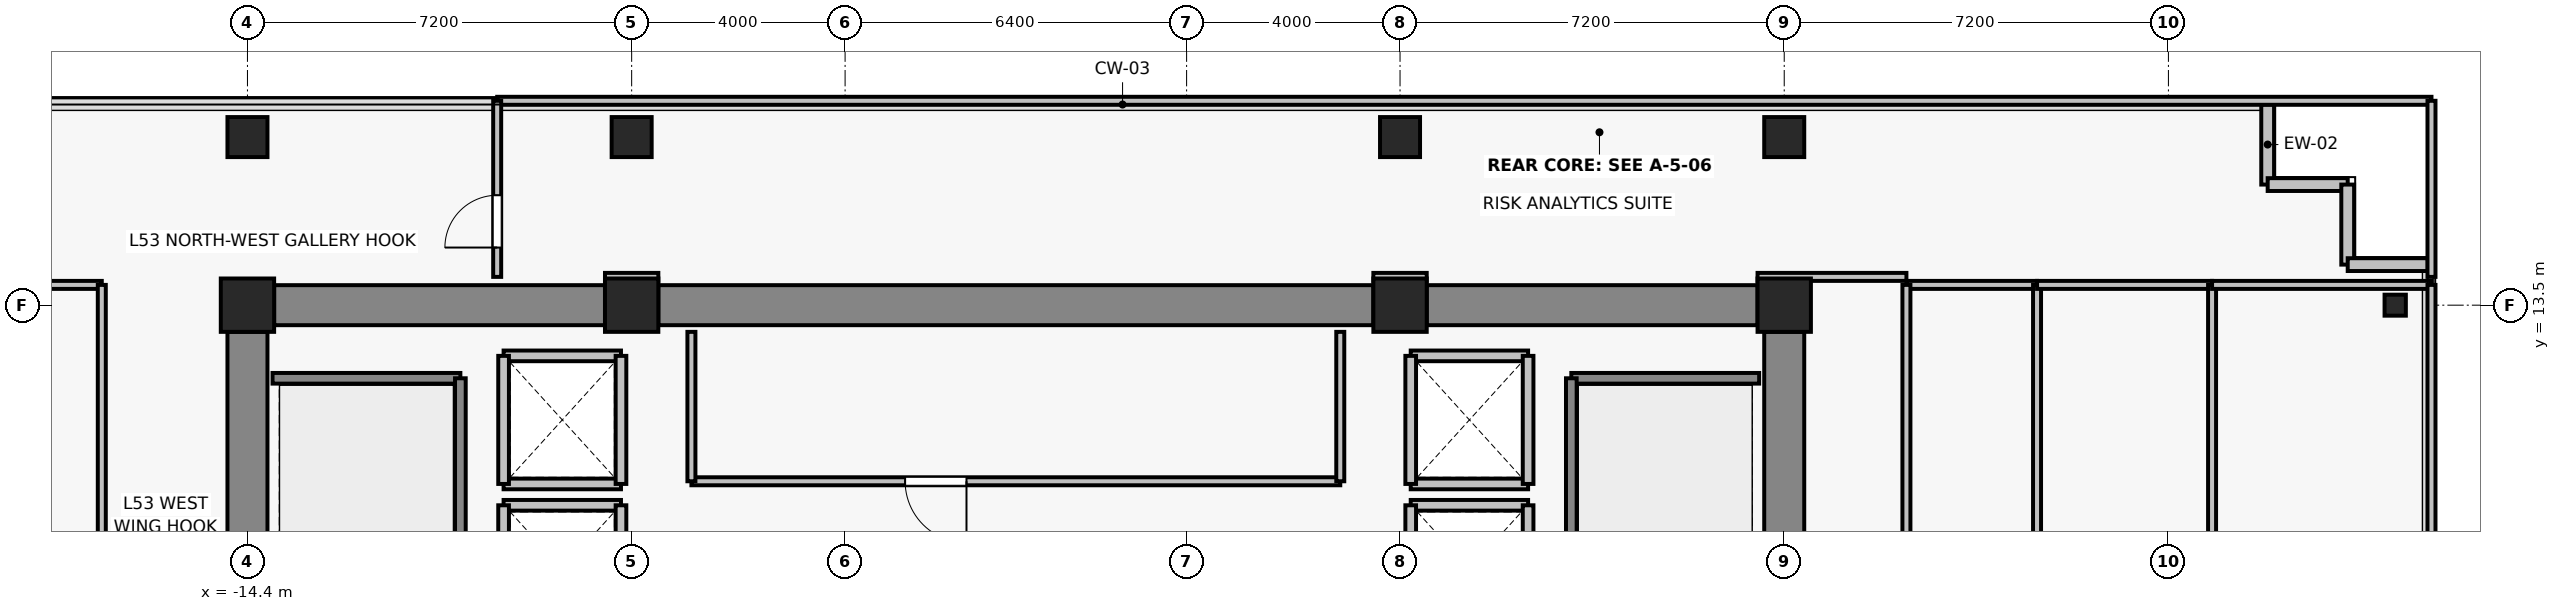
"""IFC4 building model, lengths in metres.
Left out: names, types, materials, properties, quantities, classifications, styles, units other than length and angle.
Written with IfcOpenShell. Run it as: python <this file> out.ifc"""

import sys

from ifc_helpers import new_model, si_unit, direction, frame, frame_2d, origin, origin_2d, place, context, subcontext, project, spatial, rectangle, i_section, extrude, source, transform, mapped, element, fill, save


model = new_model("IFC4")
c1 = context("Model", 3, precision=1e-05, world=origin(), true_north=direction((0.0, 1.0)))
c2 = subcontext(c1, "Body", "Model", "MODEL_VIEW")
j1 = project(units=[si_unit("LENGTHUNIT", "METRE"), si_unit("PLANEANGLEUNIT", "RADIAN")], contexts=[c1])
p1 = place(None, origin())
s1 = spatial("IfcSite", under=j1, at=p1, CompositionType="ELEMENT")
p2 = place(p1, origin())
s2 = spatial("IfcBuilding", under=s1, at=p2, CompositionType="ELEMENT")
p3 = place(p2, frame((0.0, 0.0, 189.1)))
s3 = spatial("IfcBuildingStorey", under=s2, at=p3, CompositionType="ELEMENT", Elevation=189.1)
for number, where, z_axis, x_axis in (
    (1, (-14.4, 13.5, 0.0), (0.0, 0.0, 1.0), (1.0, 0.0, 0.0)),
    (2, (-7.2, 13.5, 0.0), (0.0, 0.0, 1.0), (1.0, 0.0, 0.0)),
    (3, (7.2, 13.5, 0.0), (0.0, 0.0, 1.0), (1.0, 0.0, 0.0)),
    (4, (14.4, 13.5, 0.0), (0.0, 0.0, 1.0), (1.0, 0.0, 0.0)),
):
    element("IfcColumn", number, at=place(p3, frame(where, z_axis=z_axis, x_axis=x_axis)), inside=s3, PredefinedType="COLUMN", context=c2, shape_type="SweptSolid", body=[
        extrude(rectangle(XDim=1.0, YDim=1.0, at=origin_2d()), origin(), (0.0, 0.0, 1.0), 3.3),
    ])
for number, where, z_axis, x_axis in (
    (5, (-14.4, 16.65, 0.0), (0.0, 0.0, 1.0), (1.0, 0.0, 0.0)),
    (6, (-7.2, 16.65, 0.0), (0.0, 0.0, 1.0), (1.0, 0.0, 0.0)),
    (7, (7.2, 16.65, 0.0), (0.0, 0.0, 1.0), (1.0, 0.0, 0.0)),
    (8, (14.4, 16.65, 0.0), (0.0, 0.0, 1.0), (1.0, 0.0, 0.0)),
):
    element("IfcColumn", number, at=place(p3, frame(where, z_axis=z_axis, x_axis=x_axis)), inside=s3, PredefinedType="COLUMN", context=c2, shape_type="SweptSolid", body=[
        extrude(rectangle(XDim=0.75, YDim=0.75, at=origin_2d()), origin(), (0.0, 0.0, 1.0), 3.3),
    ])
p4 = place(p3, frame((25.85, 13.5, 0.0), z_axis=(0.0, 0.0, 1.0), x_axis=(1.0, 0.0, 0.0)))
e9 = element("IfcColumn", 9, at=p4, inside=s3, PredefinedType="COLUMN", context=c2, shape_type="SweptSolid", body=[
    extrude(i_section(OverallWidth=0.399, OverallDepth=0.394, WebThickness=0.023, FlangeThickness=0.037, FilletRadius=0.015, at=origin_2d()), origin(), (0.0, 0.0, 1.0), 3.3),
])
p5 = place(p3, frame((-13.9, 13.5, 0.0), z_axis=(0.0, 0.0, 1.0), x_axis=(1.0, 0.0, 0.0)))
e10 = element("IfcWall", 10, at=p5, inside=s3, PredefinedType="SHEAR", context=c2, shape_type="SweptSolid", body=[
    extrude(rectangle(XDim=6.2, YDim=0.75, at=frame_2d((3.1, 0.0))), origin(), (0.0, 0.0, 1.0), 3.075),
])
p6 = place(p3, frame((-6.7, 13.5, 0.0), z_axis=(0.0, 0.0, 1.0), x_axis=(1.0, 0.0, 0.0)))
e11 = element("IfcWall", 11, at=p6, inside=s3, PredefinedType="SHEAR", context=c2, shape_type="SweptSolid", body=[
    extrude(rectangle(XDim=13.4, YDim=0.75, at=frame_2d((6.7, 0.0))), origin(), (0.0, 0.0, 1.0), 3.075),
])
p7 = place(p3, frame((7.7, 13.5, 0.0), z_axis=(0.0, 0.0, 1.0), x_axis=(1.0, 0.0, 0.0)))
e12 = element("IfcWall", 12, at=p7, inside=s3, PredefinedType="SHEAR", context=c2, shape_type="SweptSolid", body=[
    extrude(rectangle(XDim=6.2, YDim=0.75, at=frame_2d((3.1, 0.0))), origin(), (0.0, 0.0, 1.0), 3.075),
])
for number, where, z_axis, x_axis in (
    (13, (-14.4, 7.1, 0.0), (0.0, 0.0, 1.0), (0.0, 1.0, 0.0)),
    (14, (14.4, 7.1, 0.0), (0.0, 0.0, 1.0), (0.0, 1.0, 0.0)),
):
    element("IfcWall", number, at=place(p3, frame(where, z_axis=z_axis, x_axis=x_axis)), inside=s3, PredefinedType="SHEAR", context=c2, shape_type="SweptSolid", body=[
        extrude(rectangle(XDim=5.9, YDim=0.75, at=frame_2d((2.95, 0.0))), origin(), (0.0, 0.0, 1.0), 3.075),
    ])
for number, where, z_axis, x_axis in (
    (15, (23.46, 15.76, 0.0), (0.0, 0.0, 1.0), (0.0, 1.0, 0.0)),
    (16, (24.96, 15.76, 0.0), (0.0, 0.0, 1.0), (-1.0, 0.0, 0.0)),
    (17, (24.96, 14.26, 0.0), (0.0, 0.0, 1.0), (0.0, 1.0, 0.0)),
    (18, (26.46, 14.26, 0.0), (0.0, 0.0, 1.0), (-1.0, 0.0, 0.0)),
):
    element("IfcWall", number, at=place(p3, frame(where, z_axis=z_axis, x_axis=x_axis)), inside=s3, PredefinedType="SOLIDWALL", context=c2, shape_type="SweptSolid", body=[
        extrude(rectangle(XDim=1.5, YDim=0.24, at=frame_2d((0.75, 0.0))), origin(), (0.0, 0.0, 1.0), 3.075),
    ])
p8 = place(p3, frame((-9.6, 9.75, 0.0), z_axis=(0.0, 0.0, 1.0), x_axis=(1.0, 0.0, 0.0)))
e19 = element("IfcWall", 19, at=p8, inside=s3, PredefinedType="SOLIDWALL", context=c2, shape_type="SweptSolid", body=[
    extrude(rectangle(XDim=2.2, YDim=0.2, at=frame_2d((1.1, 0.0))), origin(), (0.0, 0.0, 1.0), 2.565),
])
p9 = place(p3, frame((-9.6, 7.35, 0.0), z_axis=(0.0, 0.0, 1.0), x_axis=(0.0, 1.0, 0.0)))
e20 = element("IfcWall", 20, at=p9, inside=s3, PredefinedType="SOLIDWALL", context=c2, shape_type="SweptSolid", body=[
    extrude(rectangle(XDim=2.4, YDim=0.2, at=frame_2d((1.2, 0.0))), origin(), (0.0, 0.0, 1.0), 3.075),
])
p10 = place(p3, frame((-7.4, 9.75, 0.0), z_axis=(0.0, 0.0, 1.0), x_axis=(0.0, -1.0, 0.0)))
e21 = element("IfcWall", 21, at=p10, inside=s3, PredefinedType="SOLIDWALL", context=c2, shape_type="SweptSolid", body=[
    extrude(rectangle(XDim=2.4, YDim=0.2, at=frame_2d((1.2, 0.0))), origin(), (0.0, 0.0, 1.0), 2.565),
])
for number, where, z_axis, x_axis in (
    (22, (-7.4, 10.15, 0.0), (0.0, 0.0, 1.0), (-1.0, 0.0, 0.0)),
    (23, (-9.6, 12.55, 0.0), (0.0, 0.0, 1.0), (1.0, 0.0, 0.0)),
):
    element("IfcWall", number, at=place(p3, frame(where, z_axis=z_axis, x_axis=x_axis)), inside=s3, PredefinedType="SOLIDWALL", context=c2, shape_type="SweptSolid", body=[
        extrude(rectangle(XDim=2.2, YDim=0.2, at=frame_2d((1.1, 0.0))), origin(), (0.0, 0.0, 1.0), 2.565),
    ])
p11 = place(p3, frame((-9.6, 10.15, 0.0), z_axis=(0.0, 0.0, 1.0), x_axis=(0.0, 1.0, 0.0)))
e24 = element("IfcWall", 24, at=p11, inside=s3, PredefinedType="SOLIDWALL", context=c2, shape_type="SweptSolid", body=[
    extrude(rectangle(XDim=2.4, YDim=0.2, at=frame_2d((1.2, 0.0))), origin(), (0.0, 0.0, 1.0), 3.075),
])
p12 = place(p3, frame((-7.4, 12.55, 0.0), z_axis=(0.0, 0.0, 1.0), x_axis=(0.0, -1.0, 0.0)))
e25 = element("IfcWall", 25, at=p12, inside=s3, PredefinedType="SOLIDWALL", context=c2, shape_type="SweptSolid", body=[
    extrude(rectangle(XDim=2.4, YDim=0.2, at=frame_2d((1.2, 0.0))), origin(), (0.0, 0.0, 1.0), 2.565),
])
p13 = place(p3, frame((7.4, 9.75, 0.0), z_axis=(0.0, 0.0, 1.0), x_axis=(1.0, 0.0, 0.0)))
e26 = element("IfcWall", 26, at=p13, inside=s3, PredefinedType="SOLIDWALL", context=c2, shape_type="SweptSolid", body=[
    extrude(rectangle(XDim=2.2, YDim=0.2, at=frame_2d((1.1, 0.0))), origin(), (0.0, 0.0, 1.0), 2.565),
])
p14 = place(p3, frame((7.4, 7.35, 0.0), z_axis=(0.0, 0.0, 1.0), x_axis=(0.0, 1.0, 0.0)))
e27 = element("IfcWall", 27, at=p14, inside=s3, PredefinedType="SOLIDWALL", context=c2, shape_type="SweptSolid", body=[
    extrude(rectangle(XDim=2.4, YDim=0.2, at=frame_2d((1.2, 0.0))), origin(), (0.0, 0.0, 1.0), 2.565),
])
p15 = place(p3, frame((9.6, 9.75, 0.0), z_axis=(0.0, 0.0, 1.0), x_axis=(0.0, -1.0, 0.0)))
e28 = element("IfcWall", 28, at=p15, inside=s3, PredefinedType="SOLIDWALL", context=c2, shape_type="SweptSolid", body=[
    extrude(rectangle(XDim=2.4, YDim=0.2, at=frame_2d((1.2, 0.0))), origin(), (0.0, 0.0, 1.0), 3.075),
])
for number, where, z_axis, x_axis in (
    (29, (9.6, 10.15, 0.0), (0.0, 0.0, 1.0), (-1.0, 0.0, 0.0)),
    (30, (7.4, 12.55, 0.0), (0.0, 0.0, 1.0), (1.0, 0.0, 0.0)),
):
    element("IfcWall", number, at=place(p3, frame(where, z_axis=z_axis, x_axis=x_axis)), inside=s3, PredefinedType="SOLIDWALL", context=c2, shape_type="SweptSolid", body=[
        extrude(rectangle(XDim=2.2, YDim=0.2, at=frame_2d((1.1, 0.0))), origin(), (0.0, 0.0, 1.0), 2.565),
    ])
p16 = place(p3, frame((7.4, 10.15, 0.0), z_axis=(0.0, 0.0, 1.0), x_axis=(0.0, 1.0, 0.0)))
e31 = element("IfcWall", 31, at=p16, inside=s3, PredefinedType="SOLIDWALL", context=c2, shape_type="SweptSolid", body=[
    extrude(rectangle(XDim=2.4, YDim=0.2, at=frame_2d((1.2, 0.0))), origin(), (0.0, 0.0, 1.0), 2.565),
])
p17 = place(p3, frame((9.6, 12.55, 0.0), z_axis=(0.0, 0.0, 1.0), x_axis=(0.0, -1.0, 0.0)))
e32 = element("IfcWall", 32, at=p17, inside=s3, PredefinedType="SOLIDWALL", context=c2, shape_type="SweptSolid", body=[
    extrude(rectangle(XDim=2.4, YDim=0.2, at=frame_2d((1.2, 0.0))), origin(), (0.0, 0.0, 1.0), 3.075),
])
p18 = place(p3, frame((-13.93, 12.13, 0.0), z_axis=(0.0, 0.0, 1.0), x_axis=(1.0, 0.0, 0.0)))
e33 = element("IfcWall", 33, at=p18, inside=s3, PredefinedType="SOLIDWALL", context=c2, shape_type="SweptSolid", body=[
    extrude(rectangle(XDim=3.52, YDim=0.2, at=frame_2d((1.76, 0.0))), origin(), (0.0, 0.0, 1.0), 3.075),
])
p19 = place(p3, frame((-10.41, 12.13, 0.0), z_axis=(0.0, 0.0, 1.0), x_axis=(0.0, -1.0, 0.0)))
e34 = element("IfcWall", 34, at=p19, inside=s3, PredefinedType="SOLIDWALL", context=c2, shape_type="SweptSolid", body=[
    extrude(rectangle(XDim=8.84, YDim=0.2, at=frame_2d((4.42, 0.0))), origin(), (0.0, 0.0, 1.0), 3.075),
])
p20 = place(p3, frame((10.41, 12.13, 0.0), z_axis=(0.0, 0.0, 1.0), x_axis=(1.0, 0.0, 0.0)))
e35 = element("IfcWall", 35, at=p20, inside=s3, PredefinedType="SOLIDWALL", context=c2, shape_type="SweptSolid", body=[
    extrude(rectangle(XDim=3.52, YDim=0.2, at=frame_2d((1.76, 0.0))), origin(), (0.0, 0.0, 1.0), 3.075),
])
p21 = place(p3, frame((10.41, 3.29, 0.0), z_axis=(0.0, 0.0, 1.0), x_axis=(0.0, 1.0, 0.0)))
e36 = element("IfcWall", 36, at=p21, inside=s3, PredefinedType="SOLIDWALL", context=c2, shape_type="SweptSolid", body=[
    extrude(rectangle(XDim=8.84, YDim=0.2, at=frame_2d((4.42, 0.0))), origin(), (0.0, 0.0, 1.0), 3.075),
])
p22 = place(p3, frame((6.08, 10.2, 0.0), z_axis=(0.0, 0.0, 1.0), x_axis=(-1.0, 0.0, 0.0)))
e37 = element("IfcWall", 37, at=p22, inside=s3, PredefinedType="PARTITIONING", context=c2, shape_type="SweptSolid", body=[
    extrude(rectangle(XDim=12.16, YDim=0.15, at=frame_2d((6.08, 0.0))), origin(), (0.0, 0.0, 1.0), 3.075),
])
p23 = place(p22, frame((7.005, 0.0, 0.0)))
e38 = element("IfcOpeningElement", 38, at=p23, cuts=e37, PredefinedType="OPENING", context=c2, shape_type="SweptSolid", body=[
    extrude(rectangle(XDim=1.15, YDim=2.15, at=frame_2d((0.575, 1.075))), frame((0.0, 0.085, 0.0), z_axis=(0.0, -1.0, 0.0), x_axis=(1.0, 0.0, 0.0)), (0.0, 0.0, 1.0), 0.17),
])
for number, where, z_axis, x_axis in (
    (39, (-6.08, 10.2, 0.0), (0.0, 0.0, 1.0), (0.0, 1.0, 0.0)),
    (40, (6.08, 13.0, 0.0), (0.0, 0.0, 1.0), (0.0, -1.0, 0.0)),
):
    element("IfcWall", number, at=place(p3, frame(where, z_axis=z_axis, x_axis=x_axis)), inside=s3, PredefinedType="PARTITIONING", context=c2, shape_type="SweptSolid", body=[
        extrude(rectangle(XDim=2.8, YDim=0.15, at=frame_2d((1.4, 0.0))), origin(), (0.0, 0.0, 1.0), 3.075),
    ])
p24 = place(p3, frame((-22.53, 13.88, 0.0), z_axis=(0.0, 0.0, 1.0), x_axis=(1.0, 0.0, 0.0)))
e41 = element("IfcWall", 41, at=p24, inside=s3, PredefinedType="PARTITIONING", context=c2, shape_type="SweptSolid", body=[
    extrude(rectangle(XDim=5.4, YDim=0.15, at=frame_2d((2.7, 0.0))), origin(), (0.0, 0.0, 1.0), 3.075),
])
p25 = place(p3, frame((-17.13, 13.88, 0.0), z_axis=(0.0, 0.0, 1.0), x_axis=(0.0, -1.0, 0.0)))
e42 = element("IfcWall", 42, at=p25, inside=s3, PredefinedType="PARTITIONING", context=c2, shape_type="SweptSolid", body=[
    extrude(rectangle(XDim=15.65, YDim=0.15, at=frame_2d((7.825, 0.0))), origin(), (0.0, 0.0, 1.0), 2.565),
])
p26 = place(p25, frame((7.335, 0.0, 0.0)))
e43 = element("IfcOpeningElement", 43, at=p26, cuts=e42, PredefinedType="OPENING", context=c2, shape_type="SweptSolid", body=[
    extrude(rectangle(XDim=0.98, YDim=2.15, at=frame_2d((0.49, 1.075))), frame((0.0, 0.085, 0.0), z_axis=(0.0, -1.0, 0.0), x_axis=(1.0, 0.0, 0.0)), (0.0, 0.0, 1.0), 0.17),
])
p27 = place(p3, frame((16.69, 13.88, 0.0), z_axis=(0.0, 0.0, 1.0), x_axis=(1.0, 0.0, 0.0)))
e44 = element("IfcWall", 44, at=p27, inside=s3, PredefinedType="PARTITIONING", context=c2, shape_type="SweptSolid", body=[
    extrude(rectangle(XDim=2.448, YDim=0.15, at=frame_2d((1.224, 0.0))), origin(), (0.0, 0.0, 1.0), 3.075),
])
for number, where, z_axis, x_axis in (
    (45, (16.69, -1.77, 0.0), (0.0, 0.0, 1.0), (0.0, 1.0, 0.0)),
    (46, (19.138, 13.88, 0.0), (0.0, 0.0, 1.0), (0.0, -1.0, 0.0)),
):
    element("IfcWall", number, at=place(p3, frame(where, z_axis=z_axis, x_axis=x_axis)), inside=s3, PredefinedType="PARTITIONING", context=c2, shape_type="SweptSolid", body=[
        extrude(rectangle(XDim=15.65, YDim=0.15, at=frame_2d((7.825, 0.0))), origin(), (0.0, 0.0, 1.0), 2.565),
    ])
p28 = place(p3, frame((19.138, 13.88, 0.0), z_axis=(0.0, 0.0, 1.0), x_axis=(1.0, 0.0, 0.0)))
e47 = element("IfcWall", 47, at=p28, inside=s3, PredefinedType="PARTITIONING", context=c2, shape_type="SweptSolid", body=[
    extrude(rectangle(XDim=3.28, YDim=0.15, at=frame_2d((1.64, 0.0))), origin(), (0.0, 0.0, 1.0), 3.075),
])
p29 = place(p3, frame((22.418, 13.88, 0.0), z_axis=(0.0, 0.0, 1.0), x_axis=(0.0, -1.0, 0.0)))
e48 = element("IfcWall", 48, at=p29, inside=s3, PredefinedType="PARTITIONING", context=c2, shape_type="SweptSolid", body=[
    extrude(rectangle(XDim=15.65, YDim=0.15, at=frame_2d((7.825, 0.0))), origin(), (0.0, 0.0, 1.0), 2.565),
])
p30 = place(p3, frame((22.418, 13.88, 0.0), z_axis=(0.0, 0.0, 1.0), x_axis=(1.0, 0.0, 0.0)))
e49 = element("IfcWall", 49, at=p30, inside=s3, PredefinedType="PARTITIONING", context=c2, shape_type="SweptSolid", body=[
    extrude(rectangle(XDim=4.112, YDim=0.15, at=frame_2d((2.056, 0.0))), origin(), (0.0, 0.0, 1.0), 3.075),
])
p31 = place(p3, frame((26.53, 13.88, 0.0), z_axis=(0.0, 0.0, 1.0), x_axis=(0.0, -1.0, 0.0)))
e50 = element("IfcWall", 50, at=p31, inside=s3, PredefinedType="PARTITIONING", context=c2, shape_type="SweptSolid", body=[
    extrude(rectangle(XDim=15.65, YDim=0.15, at=frame_2d((7.825, 0.0))), origin(), (0.0, 0.0, 1.0), 3.075),
])
for number, where, z_axis, x_axis in (
    (51, (-6.7, 14.03, 0.0), (0.0, 0.0, 1.0), (-1.0, 0.0, 0.0)),
    (52, (7.7, 14.03, 0.0), (0.0, 0.0, 1.0), (-1.0, 0.0, 0.0)),
):
    element("IfcWall", number, at=place(p3, frame(where, z_axis=z_axis, x_axis=x_axis)), inside=s3, PredefinedType="PARTITIONING", context=c2, shape_type="SweptSolid", body=[
        extrude(rectangle(XDim=1.0, YDim=0.15, at=frame_2d((0.5, 0.0))), origin(), (0.0, 0.0, 1.0), 2.565),
    ])
p32 = place(p3, frame((16.69, 14.03, 0.0), z_axis=(0.0, 0.0, 1.0), x_axis=(-1.0, 0.0, 0.0)))
e53 = element("IfcWall", 53, at=p32, inside=s3, PredefinedType="PARTITIONING", context=c2, shape_type="SweptSolid", body=[
    extrude(rectangle(XDim=2.79, YDim=0.15, at=frame_2d((1.395, 0.0))), origin(), (0.0, 0.0, 1.0), 2.565),
])
p33 = place(p3, frame((-9.72, 17.33, 0.0), z_axis=(0.0, 0.0, 1.0), x_axis=(1.0, 0.0, 0.0)))
e54 = element("IfcWall", 54, at=p33, inside=s3, PredefinedType="PARTITIONING", context=c2, shape_type="SweptSolid", body=[
    extrude(rectangle(XDim=36.25, YDim=0.15, at=frame_2d((18.125, 0.0))), origin(), (0.0, 0.0, 1.0), 3.075),
])
p34 = place(p3, frame((-9.72, 14.03, 0.0), z_axis=(0.0, 0.0, 1.0), x_axis=(0.0, 1.0, 0.0)))
e55 = element("IfcWall", 55, at=p34, inside=s3, PredefinedType="PARTITIONING", context=c2, shape_type="SweptSolid", body=[
    extrude(rectangle(XDim=3.3, YDim=0.15, at=frame_2d((1.65, 0.0))), origin(), (0.0, 0.0, 1.0), 2.565),
])
p35 = place(p34, frame((0.55, 0.0, 0.0)))
e56 = element("IfcOpeningElement", 56, at=p35, cuts=e55, PredefinedType="OPENING", context=c2, shape_type="SweptSolid", body=[
    extrude(rectangle(XDim=0.98, YDim=2.15, at=frame_2d((0.49, 1.075))), frame((0.0, 0.085, 0.0), z_axis=(0.0, -1.0, 0.0), x_axis=(1.0, 0.0, 0.0)), (0.0, 0.0, 1.0), 0.17),
])
p36 = place(p3, frame((26.53, 17.33, 0.0), z_axis=(0.0, 0.0, 1.0), x_axis=(0.0, -1.0, 0.0)))
e57 = element("IfcWall", 57, at=p36, inside=s3, PredefinedType="PARTITIONING", context=c2, shape_type="SweptSolid", body=[
    extrude(rectangle(XDim=3.3, YDim=0.15, at=frame_2d((1.65, 0.0))), origin(), (0.0, 0.0, 1.0), 3.075),
])
m1 = source(origin(), c2, "Body", "SweptSolid", [
    extrude(rectangle(XDim=1.15, YDim=2.15, at=frame_2d((0.575, 1.075))), frame((0.0, 0.025, 0.0), z_axis=(0.0, -1.0, 0.0), x_axis=(1.0, 0.0, 0.0)), (0.0, 0.0, 1.0), 0.05),
])
p37 = place(p23, origin())
e58 = element("IfcDoor", 58, at=p37, inside=s3, OperationType="SINGLE_SWING_LEFT", PredefinedType="DOOR", context=c2, shape_type="MappedRepresentation", body=[
    mapped(m1, transform((0.0, 0.0, 0.0), x_axis=(1.0, 0.0, 0.0), y_axis=(0.0, 1.0, 0.0), z_axis=(0.0, 0.0, 1.0), scale=1.0)),
])
fill(e38, e58)
m2 = source(origin(), c2, "Body", "SweptSolid", [
    extrude(rectangle(XDim=0.98, YDim=2.15, at=frame_2d((0.49, 1.075))), frame((0.0, 0.025, 0.0), z_axis=(0.0, -1.0, 0.0), x_axis=(1.0, 0.0, 0.0)), (0.0, 0.0, 1.0), 0.05),
])
p38 = place(p35, origin())
e59 = element("IfcDoor", 59, at=p38, inside=s3, OperationType="SINGLE_SWING_LEFT", PredefinedType="DOOR", context=c2, shape_type="MappedRepresentation", body=[
    mapped(m2, transform((0.0, 0.0, 0.0), x_axis=(1.0, 0.0, 0.0), y_axis=(0.0, 1.0, 0.0), z_axis=(0.0, 0.0, 1.0), scale=1.0)),
])
fill(e56, e59)
save(model, sys.argv[1])
